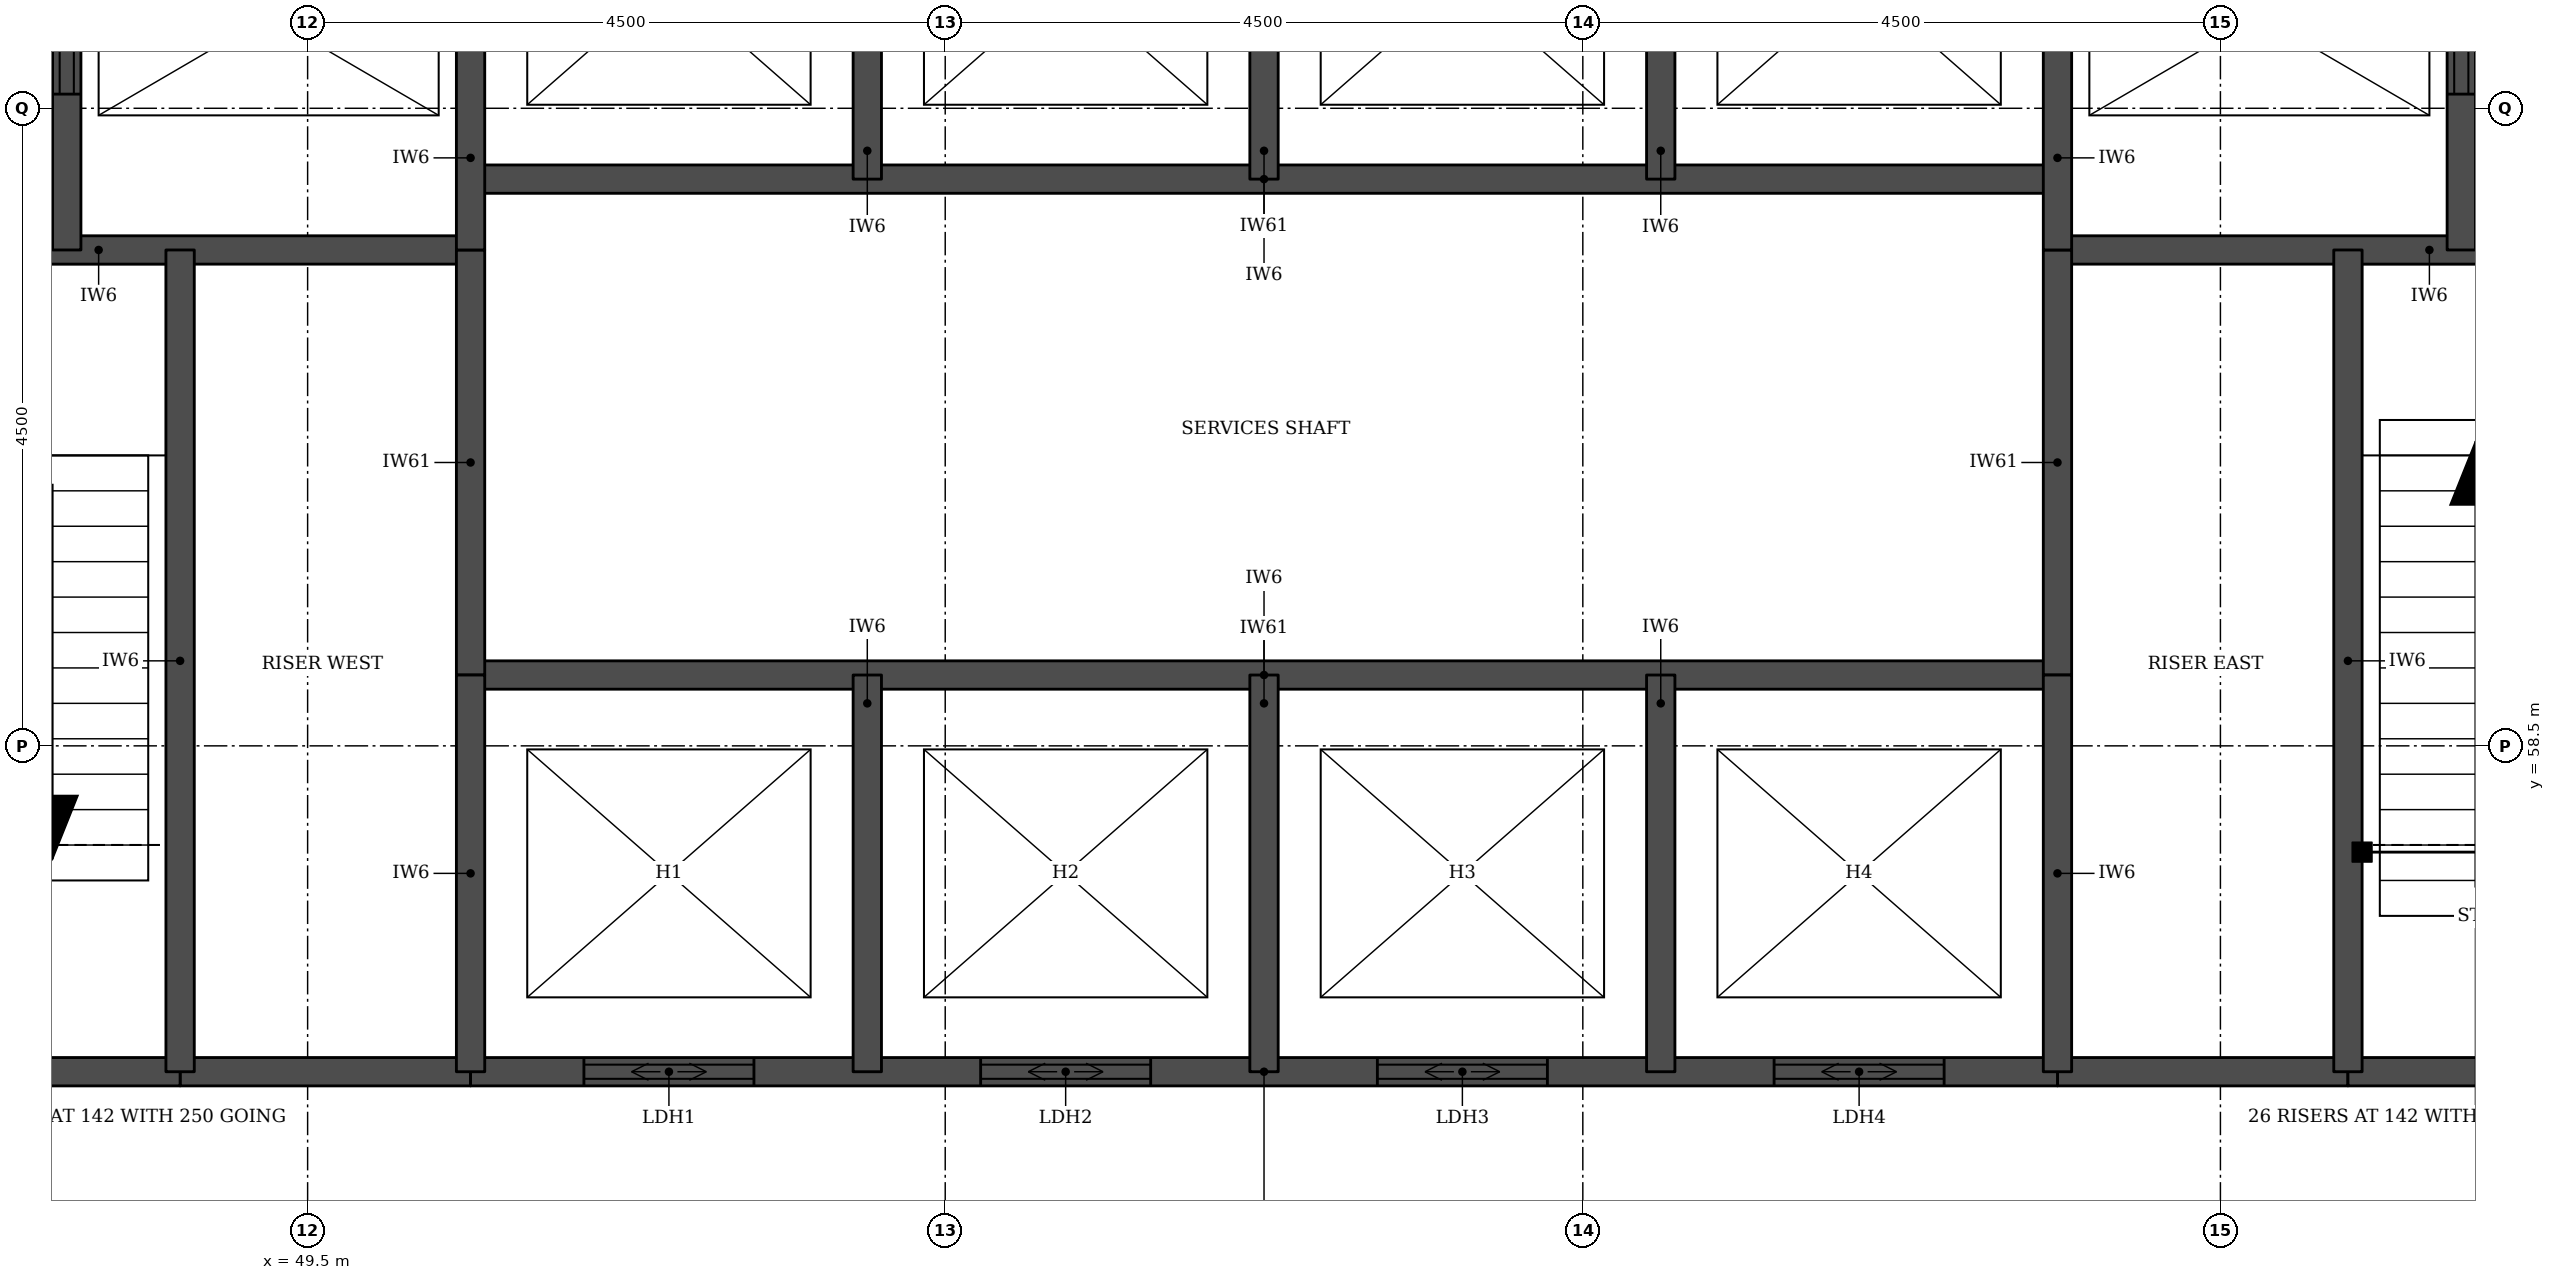
"""IFC4 building model, lengths in metres.
Left out: names, types, materials, properties, quantities, classifications, styles, units other than length and angle.
Written with IfcOpenShell. Run it as: python <this file> out.ifc"""

import sys

from ifc_helpers import new_model, si_unit, direction, frame, frame_2d, origin, place, context, subcontext, project, spatial, rectangle, extrude, element, fill, save


model = new_model("IFC4")
c1 = context("Model", 3, precision=1e-05, world=origin(), true_north=direction((0.0, 1.0)))
c2 = subcontext(c1, "Body", "Model", "MODEL_VIEW")
j1 = project(units=[si_unit("LENGTHUNIT", "METRE"), si_unit("PLANEANGLEUNIT", "RADIAN")], contexts=[c1])
p1 = place(None, origin())
s1 = spatial("IfcSite", under=j1, at=p1, CompositionType="ELEMENT")
p2 = place(p1, origin())
s2 = spatial("IfcBuilding", under=s1, at=p2, CompositionType="ELEMENT")
p3 = place(p2, frame((0.0, 0.0, 252.6)))
s3 = spatial("IfcBuildingStorey", under=s2, at=p3, CompositionType="ELEMENT", Elevation=252.6)
for number, where, z_axis, x_axis in (
    (1, (48.6, 56.2, 0.0), (0.0, 0.0, 1.0), (1.0, 0.0, 0.0)),
    (2, (61.85, 56.2, 0.0), (0.0, 0.0, 1.0), (1.0, 0.0, 0.0)),
):
    element("IfcWall", number, at=place(p3, frame(where, z_axis=z_axis, x_axis=x_axis)), inside=s3, PredefinedType="SOLIDWALL", context=c2, shape_type="SweptSolid", body=[
        extrude(rectangle(XDim=2.05, YDim=0.2, at=frame_2d((1.025, 0.0))), origin(), (0.0, 0.0, 1.0), 3.55),
    ])
p4 = place(p3, frame((45.4, 56.2, 0.0), z_axis=(0.0, 0.0, 1.0), x_axis=(1.0, 0.0, 0.0)))
e3 = element("IfcWall", 3, at=p4, inside=s3, PredefinedType="SOLIDWALL", context=c2, shape_type="SweptSolid", body=[
    extrude(rectangle(XDim=3.2, YDim=0.2, at=frame_2d((1.6, 0.0))), origin(), (0.0, 0.0, 1.0), 3.55),
])
p5 = place(p3, frame((50.65, 56.2, 0.0), z_axis=(0.0, 0.0, 1.0), x_axis=(1.0, 0.0, 0.0)))
e4 = element("IfcWall", 4, at=p5, inside=s3, PredefinedType="SOLIDWALL", context=c2, shape_type="SweptSolid", body=[
    extrude(rectangle(XDim=11.2, YDim=0.2, at=frame_2d((5.6, 0.0))), origin(), (0.0, 0.0, 1.0), 3.55),
])
p6 = place(p5, frame((0.8, 0.0, 0.0)))
e5 = element("IfcOpeningElement", 5, at=p6, cuts=e4, PredefinedType="OPENING", context=c2, shape_type="SweptSolid", body=[
    extrude(rectangle(XDim=1.2, YDim=2.1, at=frame_2d((0.6, 1.05))), frame((0.0, 0.11, 0.0), z_axis=(0.0, -1.0, 0.0), x_axis=(1.0, 0.0, 0.0)), (0.0, 0.0, 1.0), 0.22),
])
p7 = place(p5, frame((3.6, 0.0, 0.0)))
e6 = element("IfcOpeningElement", 6, at=p7, cuts=e4, PredefinedType="OPENING", context=c2, shape_type="SweptSolid", body=[
    extrude(rectangle(XDim=1.2, YDim=2.1, at=frame_2d((0.6, 1.05))), frame((0.0, 0.11, 0.0), z_axis=(0.0, -1.0, 0.0), x_axis=(1.0, 0.0, 0.0)), (0.0, 0.0, 1.0), 0.22),
])
p8 = place(p5, frame((6.4, 0.0, 0.0)))
e7 = element("IfcOpeningElement", 7, at=p8, cuts=e4, PredefinedType="OPENING", context=c2, shape_type="SweptSolid", body=[
    extrude(rectangle(XDim=1.2, YDim=2.1, at=frame_2d((0.6, 1.05))), frame((0.0, 0.11, 0.0), z_axis=(0.0, -1.0, 0.0), x_axis=(1.0, 0.0, 0.0)), (0.0, 0.0, 1.0), 0.22),
])
p9 = place(p5, frame((9.2, 0.0, 0.0)))
e8 = element("IfcOpeningElement", 8, at=p9, cuts=e4, PredefinedType="OPENING", context=c2, shape_type="SweptSolid", body=[
    extrude(rectangle(XDim=1.2, YDim=2.1, at=frame_2d((0.6, 1.05))), frame((0.0, 0.11, 0.0), z_axis=(0.0, -1.0, 0.0), x_axis=(1.0, 0.0, 0.0)), (0.0, 0.0, 1.0), 0.22),
])
p10 = place(p3, frame((63.9, 56.2, 0.0), z_axis=(0.0, 0.0, 1.0), x_axis=(1.0, 0.0, 0.0)))
e9 = element("IfcWall", 9, at=p10, inside=s3, PredefinedType="SOLIDWALL", context=c2, shape_type="SweptSolid", body=[
    extrude(rectangle(XDim=3.2, YDim=0.2, at=frame_2d((1.6, 0.0))), origin(), (0.0, 0.0, 1.0), 3.55),
])
p11 = place(p3, frame((50.65, 59.0, 0.0), z_axis=(0.0, 0.0, 1.0), x_axis=(1.0, 0.0, 0.0)))
e10 = element("IfcWall", 10, at=p11, inside=s3, PredefinedType="SOLIDWALL", context=c2, shape_type="SweptSolid", body=[
    extrude(rectangle(XDim=11.2, YDim=0.2, at=frame_2d((5.6, 0.0))), origin(), (0.0, 0.0, 1.0), 3.7),
])
for number, where, z_axis, x_axis in (
    (11, (45.4, 62.0, 0.0), (0.0, 0.0, 1.0), (1.0, 0.0, 0.0)),
    (12, (61.85, 62.0, 0.0), (0.0, 0.0, 1.0), (1.0, 0.0, 0.0)),
):
    element("IfcWall", number, at=place(p3, frame(where, z_axis=z_axis, x_axis=x_axis)), inside=s3, PredefinedType="SOLIDWALL", context=c2, shape_type="SweptSolid", body=[
        extrude(rectangle(XDim=5.25, YDim=0.2, at=frame_2d((2.625, 0.0))), origin(), (0.0, 0.0, 1.0), 3.55),
    ])
p12 = place(p3, frame((50.65, 62.5, 0.0), z_axis=(0.0, 0.0, 1.0), x_axis=(1.0, 0.0, 0.0)))
e13 = element("IfcWall", 13, at=p12, inside=s3, PredefinedType="SOLIDWALL", context=c2, shape_type="SweptSolid", body=[
    extrude(rectangle(XDim=11.2, YDim=0.2, at=frame_2d((5.6, 0.0))), origin(), (0.0, 0.0, 1.0), 3.7),
])
p13 = place(p3, frame((47.8, 62.0, 0.0), z_axis=(0.0, 0.0, 1.0), x_axis=(0.0, 1.0, 0.0)))
e14 = element("IfcWall", 14, at=p13, inside=s3, PredefinedType="SOLIDWALL", context=c2, shape_type="SweptSolid", body=[
    extrude(rectangle(XDim=3.3, YDim=0.2, at=frame_2d((1.65, 0.0))), origin(), (0.0, 0.0, 1.0), 3.55),
])
p14 = place(p13, frame((1.1, 0.0, 0.0)))
e15 = element("IfcOpeningElement", 15, at=p14, cuts=e14, PredefinedType="OPENING", context=c2, shape_type="SweptSolid", body=[
    extrude(rectangle(XDim=1.1, YDim=2.1, at=frame_2d((0.55, 1.05))), frame((0.0, 0.11, 0.0), z_axis=(0.0, -1.0, 0.0), x_axis=(1.0, 0.0, 0.0)), (0.0, 0.0, 1.0), 0.22),
])
p15 = place(p3, frame((48.6, 56.2, 0.0), z_axis=(0.0, 0.0, 1.0), x_axis=(0.0, 1.0, 0.0)))
e16 = element("IfcWall", 16, at=p15, inside=s3, PredefinedType="SOLIDWALL", context=c2, shape_type="SweptSolid", body=[
    extrude(rectangle(XDim=5.8, YDim=0.2, at=frame_2d((2.9, 0.0))), origin(), (0.0, 0.0, 1.0), 3.55),
])
p16 = place(p3, frame((50.65, 59.0, 0.0), z_axis=(0.0, 0.0, 1.0), x_axis=(0.0, 1.0, 0.0)))
e17 = element("IfcWall", 17, at=p16, inside=s3, PredefinedType="SOLIDWALL", context=c2, shape_type="SweptSolid", body=[
    extrude(rectangle(XDim=3.0, YDim=0.2, at=frame_2d((1.5, 0.0))), origin(), (0.0, 0.0, 1.0), 3.7),
])
p17 = place(p3, frame((50.65, 56.2, 0.0), z_axis=(0.0, 0.0, 1.0), x_axis=(0.0, 1.0, 0.0)))
e18 = element("IfcWall", 18, at=p17, inside=s3, PredefinedType="SOLIDWALL", context=c2, shape_type="SweptSolid", body=[
    extrude(rectangle(XDim=2.8, YDim=0.2, at=frame_2d((1.4, 0.0))), origin(), (0.0, 0.0, 1.0), 3.55),
])
p18 = place(p3, frame((50.65, 62.0, 0.0), z_axis=(0.0, 0.0, 1.0), x_axis=(0.0, 1.0, 0.0)))
e19 = element("IfcWall", 19, at=p18, inside=s3, PredefinedType="SOLIDWALL", context=c2, shape_type="SweptSolid", body=[
    extrude(rectangle(XDim=3.3, YDim=0.2, at=frame_2d((1.65, 0.0))), origin(), (0.0, 0.0, 1.0), 3.55),
])
for number, where, z_axis, x_axis in (
    (20, (53.45, 56.2, 0.0), (0.0, 0.0, 1.0), (0.0, 1.0, 0.0)),
    (21, (53.45, 62.5, 0.0), (0.0, 0.0, 1.0), (0.0, 1.0, 0.0)),
    (22, (56.25, 56.2, 0.0), (0.0, 0.0, 1.0), (0.0, 1.0, 0.0)),
    (23, (56.25, 62.5, 0.0), (0.0, 0.0, 1.0), (0.0, 1.0, 0.0)),
    (24, (59.05, 56.2, 0.0), (0.0, 0.0, 1.0), (0.0, 1.0, 0.0)),
    (25, (59.05, 62.5, 0.0), (0.0, 0.0, 1.0), (0.0, 1.0, 0.0)),
):
    element("IfcWall", number, at=place(p3, frame(where, z_axis=z_axis, x_axis=x_axis)), inside=s3, PredefinedType="SOLIDWALL", context=c2, shape_type="SweptSolid", body=[
        extrude(rectangle(XDim=2.8, YDim=0.2, at=frame_2d((1.4, 0.0))), origin(), (0.0, 0.0, 1.0), 3.55),
    ])
p19 = place(p3, frame((61.85, 59.0, 0.0), z_axis=(0.0, 0.0, 1.0), x_axis=(0.0, 1.0, 0.0)))
e26 = element("IfcWall", 26, at=p19, inside=s3, PredefinedType="SOLIDWALL", context=c2, shape_type="SweptSolid", body=[
    extrude(rectangle(XDim=3.0, YDim=0.2, at=frame_2d((1.5, 0.0))), origin(), (0.0, 0.0, 1.0), 3.7),
])
p20 = place(p3, frame((61.85, 56.2, 0.0), z_axis=(0.0, 0.0, 1.0), x_axis=(0.0, 1.0, 0.0)))
e27 = element("IfcWall", 27, at=p20, inside=s3, PredefinedType="SOLIDWALL", context=c2, shape_type="SweptSolid", body=[
    extrude(rectangle(XDim=2.8, YDim=0.2, at=frame_2d((1.4, 0.0))), origin(), (0.0, 0.0, 1.0), 3.55),
])
p21 = place(p3, frame((61.85, 62.0, 0.0), z_axis=(0.0, 0.0, 1.0), x_axis=(0.0, 1.0, 0.0)))
e28 = element("IfcWall", 28, at=p21, inside=s3, PredefinedType="SOLIDWALL", context=c2, shape_type="SweptSolid", body=[
    extrude(rectangle(XDim=3.3, YDim=0.2, at=frame_2d((1.65, 0.0))), origin(), (0.0, 0.0, 1.0), 3.55),
])
p22 = place(p3, frame((63.9, 56.2, 0.0), z_axis=(0.0, 0.0, 1.0), x_axis=(0.0, 1.0, 0.0)))
e29 = element("IfcWall", 29, at=p22, inside=s3, PredefinedType="SOLIDWALL", context=c2, shape_type="SweptSolid", body=[
    extrude(rectangle(XDim=5.8, YDim=0.2, at=frame_2d((2.9, 0.0))), origin(), (0.0, 0.0, 1.0), 3.55),
])
p23 = place(p3, frame((64.7, 62.0, 0.0), z_axis=(0.0, 0.0, 1.0), x_axis=(0.0, 1.0, 0.0)))
e30 = element("IfcWall", 30, at=p23, inside=s3, PredefinedType="SOLIDWALL", context=c2, shape_type="SweptSolid", body=[
    extrude(rectangle(XDim=3.3, YDim=0.2, at=frame_2d((1.65, 0.0))), origin(), (0.0, 0.0, 1.0), 3.55),
])
p24 = place(p23, frame((1.1, 0.0, 0.0)))
e31 = element("IfcOpeningElement", 31, at=p24, cuts=e30, PredefinedType="OPENING", context=c2, shape_type="SweptSolid", body=[
    extrude(rectangle(XDim=1.1, YDim=2.1, at=frame_2d((0.55, 1.05))), frame((0.0, 0.11, 0.0), z_axis=(0.0, -1.0, 0.0), x_axis=(1.0, 0.0, 0.0)), (0.0, 0.0, 1.0), 0.22),
])
p25 = place(p6, origin())
e32 = element("IfcDoor", 32, at=p25, inside=s3, OperationType="DOUBLE_DOOR_SLIDING", PredefinedType="DOOR", context=c2, shape_type="SweptSolid", body=[
    extrude(rectangle(XDim=1.2, YDim=2.1, at=frame_2d((0.6, 1.05))), frame((0.0, 0.025, 0.0), z_axis=(0.0, -1.0, 0.0), x_axis=(1.0, 0.0, 0.0)), (0.0, 0.0, 1.0), 0.05),
])
fill(e5, e32)
p26 = place(p7, origin())
e33 = element("IfcDoor", 33, at=p26, inside=s3, OperationType="DOUBLE_DOOR_SLIDING", PredefinedType="DOOR", context=c2, shape_type="SweptSolid", body=[
    extrude(rectangle(XDim=1.2, YDim=2.1, at=frame_2d((0.6, 1.05))), frame((0.0, 0.025, 0.0), z_axis=(0.0, -1.0, 0.0), x_axis=(1.0, 0.0, 0.0)), (0.0, 0.0, 1.0), 0.05),
])
fill(e6, e33)
p27 = place(p8, origin())
e34 = element("IfcDoor", 34, at=p27, inside=s3, OperationType="DOUBLE_DOOR_SLIDING", PredefinedType="DOOR", context=c2, shape_type="SweptSolid", body=[
    extrude(rectangle(XDim=1.2, YDim=2.1, at=frame_2d((0.6, 1.05))), frame((0.0, 0.025, 0.0), z_axis=(0.0, -1.0, 0.0), x_axis=(1.0, 0.0, 0.0)), (0.0, 0.0, 1.0), 0.05),
])
fill(e7, e34)
p28 = place(p9, origin())
e35 = element("IfcDoor", 35, at=p28, inside=s3, OperationType="DOUBLE_DOOR_SLIDING", PredefinedType="DOOR", context=c2, shape_type="SweptSolid", body=[
    extrude(rectangle(XDim=1.2, YDim=2.1, at=frame_2d((0.6, 1.05))), frame((0.0, 0.025, 0.0), z_axis=(0.0, -1.0, 0.0), x_axis=(1.0, 0.0, 0.0)), (0.0, 0.0, 1.0), 0.05),
])
fill(e8, e35)
p29 = place(p14, origin())
e36 = element("IfcDoor", 36, at=p29, inside=s3, OperationType="DOUBLE_DOOR_SLIDING", PredefinedType="DOOR", context=c2, shape_type="SweptSolid", body=[
    extrude(rectangle(XDim=1.1, YDim=2.1, at=frame_2d((0.55, 1.05))), frame((0.0, 0.025, 0.0), z_axis=(0.0, -1.0, 0.0), x_axis=(1.0, 0.0, 0.0)), (0.0, 0.0, 1.0), 0.05),
])
fill(e15, e36)
p30 = place(p24, origin())
e37 = element("IfcDoor", 37, at=p30, inside=s3, OperationType="DOUBLE_DOOR_SLIDING", PredefinedType="DOOR", context=c2, shape_type="SweptSolid", body=[
    extrude(rectangle(XDim=1.1, YDim=2.1, at=frame_2d((0.55, 1.05))), frame((0.0, 0.025, 0.0), z_axis=(0.0, -1.0, 0.0), x_axis=(1.0, 0.0, 0.0)), (0.0, 0.0, 1.0), 0.05),
])
fill(e31, e37)
save(model, sys.argv[1])
